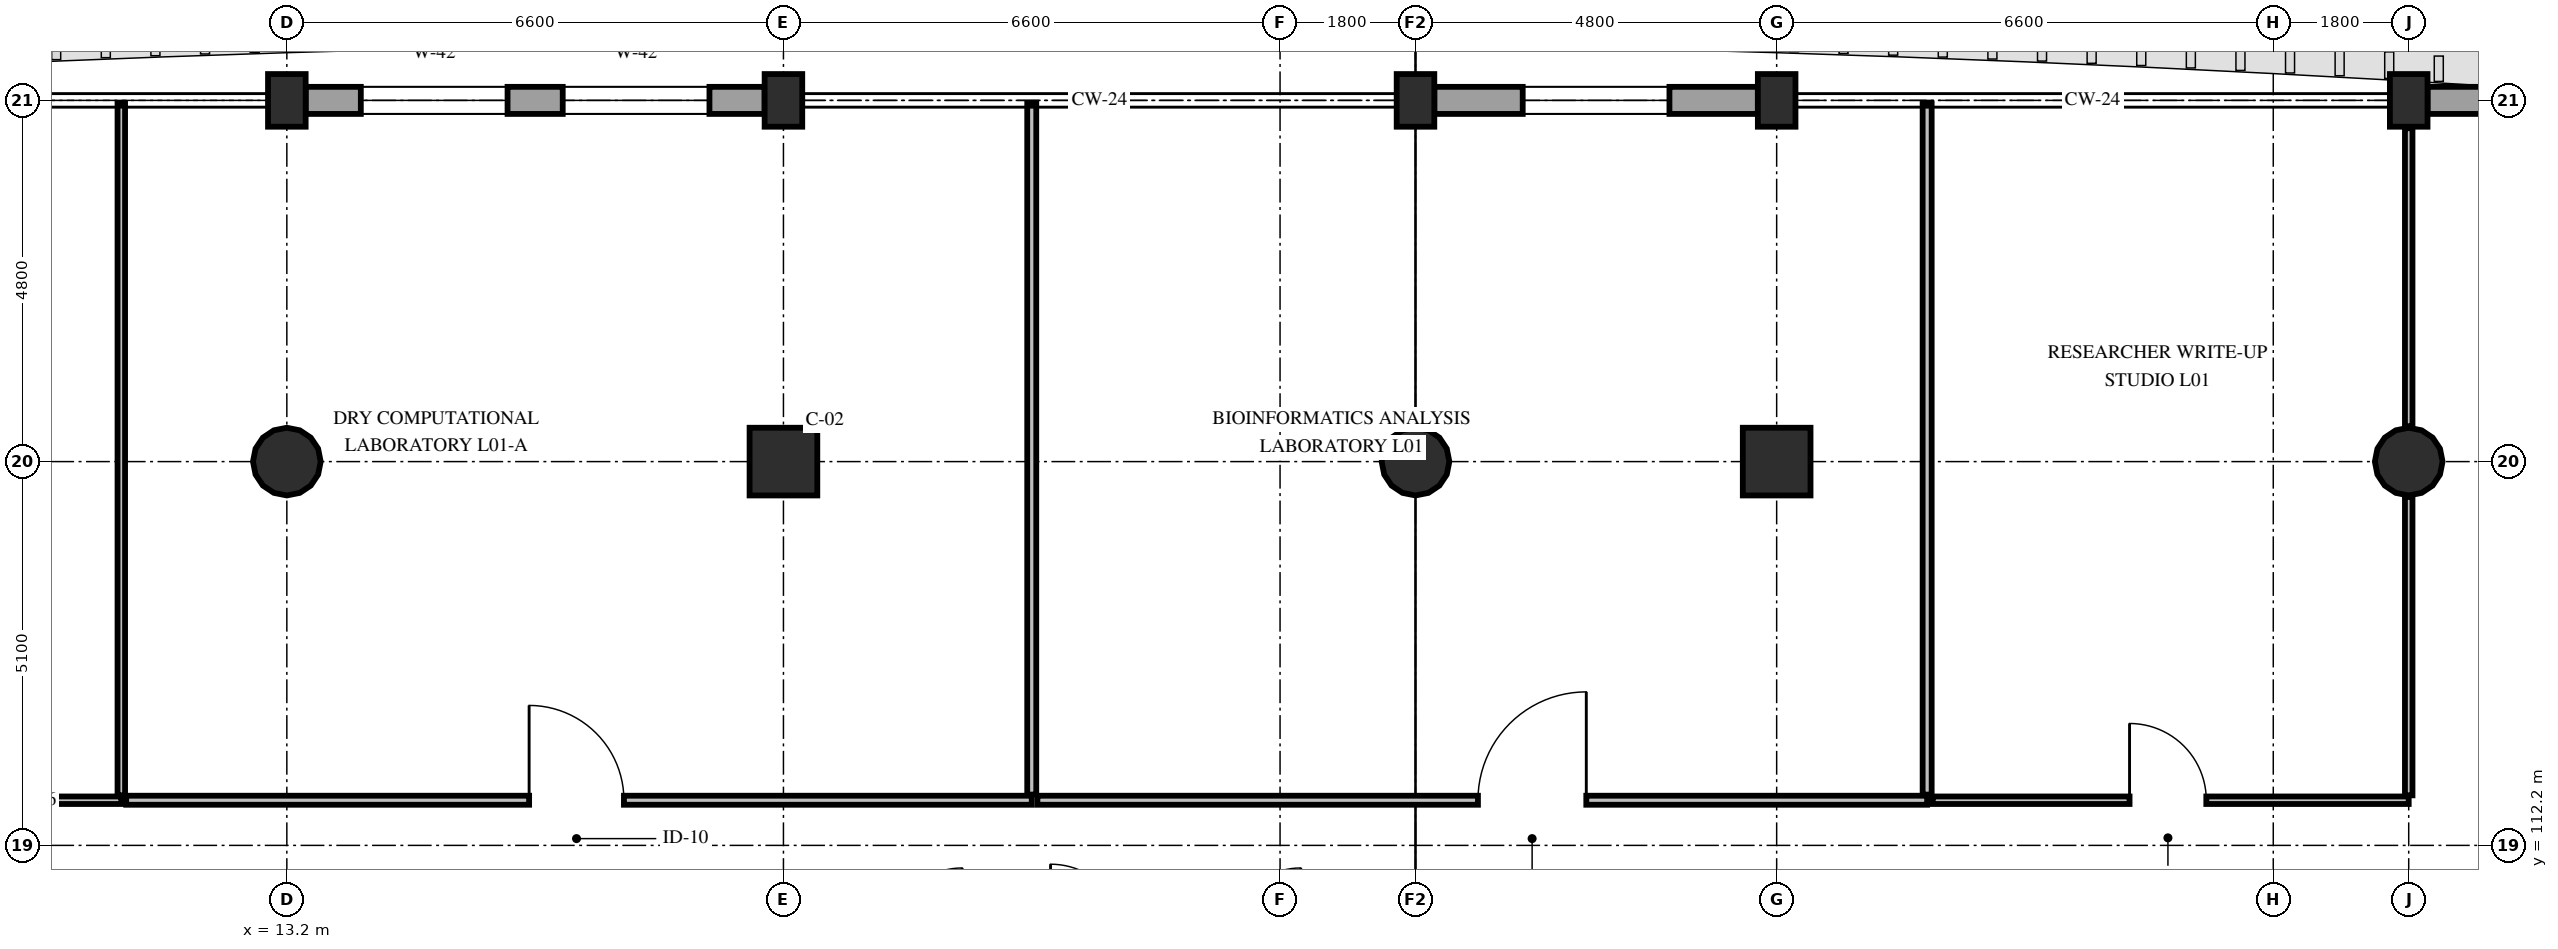
"""IFC4 building model, lengths in metres.
Left out: names, types, materials, properties, quantities, classifications, styles, units other than length and angle.
Written with IfcOpenShell. Run it as: python <this file> out.ifc"""

import sys

from ifc_helpers import new_model, si_unit, direction, frame, frame_2d, origin, origin_2d, place, context, subcontext, project, spatial, rectangle, circle, extrude, element, fill, save


model = new_model("IFC4")
c1 = context("Model", 3, precision=1e-05, world=origin(), true_north=direction((0.0, 1.0)))
c2 = subcontext(c1, "Body", "Model", "MODEL_VIEW")
j1 = project(units=[si_unit("LENGTHUNIT", "METRE"), si_unit("PLANEANGLEUNIT", "RADIAN")], contexts=[c1])
p1 = place(None, origin())
s1 = spatial("IfcSite", under=j1, at=p1, CompositionType="ELEMENT")
p2 = place(p1, origin())
s2 = spatial("IfcBuilding", under=s1, at=p2, CompositionType="ELEMENT")
p3 = place(p2, frame((0.0, 0.0, 5.4)))
s3 = spatial("IfcBuildingStorey", under=s2, at=p3, CompositionType="ELEMENT", Elevation=5.4)
p4 = place(p3, frame((13.2, 117.3, 0.0), z_axis=(0.0, 0.0, 1.0), x_axis=(1.0, 0.0, 0.0)))
e1 = element("IfcColumn", 1, at=p4, inside=s3, PredefinedType="COLUMN", context=c2, shape_type="SweptSolid", body=[
    extrude(circle(Radius=0.45, at=origin_2d()), origin(), (0.0, 0.0, 1.0), 4.8),
])
p5 = place(p3, frame((13.2, 122.1, 0.0), z_axis=(0.0, 0.0, 1.0), x_axis=(1.0, 0.0, 0.0)))
e2 = element("IfcColumn", 2, at=p5, inside=s3, PredefinedType="PILASTER", context=c2, shape_type="SweptSolid", body=[
    extrude(rectangle(XDim=0.5, YDim=0.7, at=origin_2d()), origin(), (0.0, 0.0, 1.0), 4.8),
])
p6 = place(p3, frame((19.8, 117.3, 0.0), z_axis=(0.0, 0.0, 1.0), x_axis=(1.0, 0.0, 0.0)))
e3 = element("IfcColumn", 3, at=p6, inside=s3, PredefinedType="COLUMN", context=c2, shape_type="SweptSolid", body=[
    extrude(rectangle(XDim=0.9, YDim=0.9, at=origin_2d()), origin(), (0.0, 0.0, 1.0), 4.8),
])
p7 = place(p3, frame((19.8, 122.1, 0.0), z_axis=(0.0, 0.0, 1.0), x_axis=(1.0, 0.0, 0.0)))
e4 = element("IfcColumn", 4, at=p7, inside=s3, PredefinedType="PILASTER", context=c2, shape_type="SweptSolid", body=[
    extrude(rectangle(XDim=0.5, YDim=0.7, at=origin_2d()), origin(), (0.0, 0.0, 1.0), 4.8),
])
p8 = place(p3, frame((28.2, 117.3, 0.0), z_axis=(0.0, 0.0, 1.0), x_axis=(1.0, 0.0, 0.0)))
e5 = element("IfcColumn", 5, at=p8, inside=s3, PredefinedType="COLUMN", context=c2, shape_type="SweptSolid", body=[
    extrude(circle(Radius=0.45, at=origin_2d()), origin(), (0.0, 0.0, 1.0), 4.8),
])
p9 = place(p3, frame((28.2, 122.1, 0.0), z_axis=(0.0, 0.0, 1.0), x_axis=(1.0, 0.0, 0.0)))
e6 = element("IfcColumn", 6, at=p9, inside=s3, PredefinedType="PILASTER", context=c2, shape_type="SweptSolid", body=[
    extrude(rectangle(XDim=0.5, YDim=0.7, at=origin_2d()), origin(), (0.0, 0.0, 1.0), 4.8),
])
p10 = place(p3, frame((33.0, 117.3, 0.0), z_axis=(0.0, 0.0, 1.0), x_axis=(1.0, 0.0, 0.0)))
e7 = element("IfcColumn", 7, at=p10, inside=s3, PredefinedType="COLUMN", context=c2, shape_type="SweptSolid", body=[
    extrude(rectangle(XDim=0.9, YDim=0.9, at=origin_2d()), origin(), (0.0, 0.0, 1.0), 4.8),
])
p11 = place(p3, frame((33.0, 122.1, 0.0), z_axis=(0.0, 0.0, 1.0), x_axis=(1.0, 0.0, 0.0)))
e8 = element("IfcColumn", 8, at=p11, inside=s3, PredefinedType="PILASTER", context=c2, shape_type="SweptSolid", body=[
    extrude(rectangle(XDim=0.5, YDim=0.7, at=origin_2d()), origin(), (0.0, 0.0, 1.0), 4.8),
])
p12 = place(p3, frame((41.4, 117.3, 0.0), z_axis=(0.0, 0.0, 1.0), x_axis=(1.0, 0.0, 0.0)))
e9 = element("IfcColumn", 9, at=p12, inside=s3, PredefinedType="COLUMN", context=c2, shape_type="SweptSolid", body=[
    extrude(circle(Radius=0.45, at=origin_2d()), origin(), (0.0, 0.0, 1.0), 4.8),
])
p13 = place(p3, frame((41.4, 122.1, 0.0), z_axis=(0.0, 0.0, 1.0), x_axis=(1.0, 0.0, 0.0)))
e10 = element("IfcColumn", 10, at=p13, inside=s3, PredefinedType="PILASTER", context=c2, shape_type="SweptSolid", body=[
    extrude(rectangle(XDim=0.5, YDim=0.7, at=origin_2d()), origin(), (0.0, 0.0, 1.0), 4.8),
])
p14 = place(p3, frame((13.45, 122.1, 0.0), z_axis=(0.0, 0.0, 1.0), x_axis=(1.0, 0.0, 0.0)))
e11 = element("IfcWall", 11, at=p14, inside=s3, PredefinedType="STANDARD", context=c2, shape_type="SweptSolid", body=[
    extrude(rectangle(XDim=6.1, YDim=0.36, at=frame_2d((3.05, 0.0))), origin(), (0.0, 0.0, 1.0), 3.93),
])
p15 = place(p14, frame((0.733, 0.0, 0.85)))
e12 = element("IfcOpeningElement", 12, at=p15, cuts=e11, PredefinedType="OPENING", context=c2, shape_type="SweptSolid", body=[
    extrude(rectangle(XDim=1.95, YDim=2.24, at=frame_2d((0.975, 1.12))), frame((0.0, 0.195, 0.0), z_axis=(0.0, -1.0, 0.0), x_axis=(1.0, 0.0, 0.0)), (0.0, 0.0, 1.0), 0.39),
])
p16 = place(p14, frame((3.417, 0.0, 0.85)))
e13 = element("IfcOpeningElement", 13, at=p16, cuts=e11, PredefinedType="OPENING", context=c2, shape_type="SweptSolid", body=[
    extrude(rectangle(XDim=1.95, YDim=2.24, at=frame_2d((0.975, 1.12))), frame((0.0, 0.195, 0.0), z_axis=(0.0, -1.0, 0.0), x_axis=(1.0, 0.0, 0.0)), (0.0, 0.0, 1.0), 0.39),
])
p17 = place(p3, frame((28.45, 122.1, 0.0), z_axis=(0.0, 0.0, 1.0), x_axis=(1.0, 0.0, 0.0)))
e14 = element("IfcWall", 14, at=p17, inside=s3, PredefinedType="STANDARD", context=c2, shape_type="SweptSolid", body=[
    extrude(rectangle(XDim=4.3, YDim=0.36, at=frame_2d((2.15, 0.0))), origin(), (0.0, 0.0, 1.0), 3.95),
])
p18 = place(p17, frame((1.175, 0.0, 0.85)))
e15 = element("IfcOpeningElement", 15, at=p18, cuts=e14, PredefinedType="OPENING", context=c2, shape_type="SweptSolid", body=[
    extrude(rectangle(XDim=1.95, YDim=2.24, at=frame_2d((0.975, 1.12))), frame((0.0, 0.195, 0.0), z_axis=(0.0, -1.0, 0.0), x_axis=(1.0, 0.0, 0.0)), (0.0, 0.0, 1.0), 0.39),
])
p19 = place(p3, frame((41.65, 122.1, 0.0), z_axis=(0.0, 0.0, 1.0), x_axis=(1.0, 0.0, 0.0)))
e16 = element("IfcWall", 16, at=p19, inside=s3, PredefinedType="STANDARD", context=c2, shape_type="SweptSolid", body=[
    extrude(rectangle(XDim=4.2, YDim=0.36, at=frame_2d((2.1, 0.0))), origin(), (0.0, 0.0, 1.0), 3.95),
])
p20 = place(p19, frame((1.125, 0.0, 0.85)))
e17 = element("IfcOpeningElement", 17, at=p20, cuts=e16, PredefinedType="OPENING", context=c2, shape_type="SweptSolid", body=[
    extrude(rectangle(XDim=1.95, YDim=2.24, at=frame_2d((0.975, 1.12))), frame((0.0, 0.195, 0.0), z_axis=(0.0, -1.0, 0.0), x_axis=(1.0, 0.0, 0.0)), (0.0, 0.0, 1.0), 0.39),
])
p21 = place(p3, frame((4.865, 112.8, 0.0), z_axis=(0.0, 0.0, 1.0), x_axis=(1.0, 0.0, 0.0)))
e18 = element("IfcWall", 18, at=p21, inside=s3, PredefinedType="PARTITIONING", context=c2, shape_type="SweptSolid", body=[
    extrude(rectangle(XDim=6.135, YDim=0.1, at=frame_2d((3.067, 0.0))), origin(), (0.0, 0.0, 1.0), 4.13),
])
p22 = place(p21, frame((2.545, 0.0, 0.0)))
e19 = element("IfcOpeningElement", 19, at=p22, cuts=e18, PredefinedType="OPENING", context=c2, shape_type="SweptSolid", body=[
    extrude(rectangle(XDim=0.98, YDim=2.2, at=frame_2d((0.49, 1.1))), frame((0.0, 0.065, 0.0), z_axis=(0.0, -1.0, 0.0), x_axis=(1.0, 0.0, 0.0)), (0.0, 0.0, 1.0), 0.13),
])
p23 = place(p3, frame((11.0, 112.865, 0.0), z_axis=(0.0, 0.0, 1.0), x_axis=(0.0, 1.0, 0.0)))
e20 = element("IfcWall", 20, at=p23, inside=s3, PredefinedType="PARTITIONING", context=c2, shape_type="SweptSolid", body=[
    extrude(rectangle(XDim=9.195, YDim=0.1, at=frame_2d((4.598, 0.0))), origin(), (0.0, 0.0, 1.0), 3.83),
])
p24 = place(p3, frame((11.065, 112.8, 0.0), z_axis=(0.0, 0.0, 1.0), x_axis=(1.0, 0.0, 0.0)))
e21 = element("IfcWall", 21, at=p24, inside=s3, PredefinedType="PARTITIONING", context=c2, shape_type="SweptSolid", body=[
    extrude(rectangle(XDim=12.035, YDim=0.12, at=frame_2d((6.018, 0.0))), origin(), (0.0, 0.0, 1.0), 4.13),
])
p25 = place(p24, frame((5.355, 0.0, 0.0)))
e22 = element("IfcOpeningElement", 22, at=p25, cuts=e21, PredefinedType="OPENING", context=c2, shape_type="SweptSolid", body=[
    extrude(rectangle(XDim=1.26, YDim=2.2, at=frame_2d((0.63, 1.1))), frame((0.0, 0.075, 0.0), z_axis=(0.0, -1.0, 0.0), x_axis=(1.0, 0.0, 0.0)), (0.0, 0.0, 1.0), 0.15),
])
p26 = place(p3, frame((23.1, 112.875, 0.0), z_axis=(0.0, 0.0, 1.0), x_axis=(0.0, 1.0, 0.0)))
e23 = element("IfcWall", 23, at=p26, inside=s3, PredefinedType="PARTITIONING", context=c2, shape_type="SweptSolid", body=[
    extrude(rectangle(XDim=9.185, YDim=0.12, at=frame_2d((4.593, 0.0))), origin(), (0.0, 0.0, 1.0), 3.83),
])
p27 = place(p3, frame((23.175, 112.8, 0.0), z_axis=(0.0, 0.0, 1.0), x_axis=(1.0, 0.0, 0.0)))
e24 = element("IfcWall", 24, at=p27, inside=s3, PredefinedType="PARTITIONING", context=c2, shape_type="SweptSolid", body=[
    extrude(rectangle(XDim=11.825, YDim=0.12, at=frame_2d((5.913, 0.0))), origin(), (0.0, 0.0, 1.0), 4.13),
])
p28 = place(p27, frame((5.855, 0.0, 0.0)))
e25 = element("IfcOpeningElement", 25, at=p28, cuts=e24, PredefinedType="OPENING", context=c2, shape_type="SweptSolid", body=[
    extrude(rectangle(XDim=1.44, YDim=2.25, at=frame_2d((0.72, 1.125))), frame((0.0, 0.075, 0.0), z_axis=(0.0, -1.0, 0.0), x_axis=(1.0, 0.0, 0.0)), (0.0, 0.0, 1.0), 0.15),
])
p29 = place(p3, frame((35.0, 112.875, 0.0), z_axis=(0.0, 0.0, 1.0), x_axis=(0.0, 1.0, 0.0)))
e26 = element("IfcWall", 26, at=p29, inside=s3, PredefinedType="PARTITIONING", context=c2, shape_type="SweptSolid", body=[
    extrude(rectangle(XDim=9.185, YDim=0.12, at=frame_2d((4.593, 0.0))), origin(), (0.0, 0.0, 1.0), 3.83),
])
p30 = place(p3, frame((35.075, 112.8, 0.0), z_axis=(0.0, 0.0, 1.0), x_axis=(1.0, 0.0, 0.0)))
e27 = element("IfcWall", 27, at=p30, inside=s3, PredefinedType="PARTITIONING", context=c2, shape_type="SweptSolid", body=[
    extrude(rectangle(XDim=6.325, YDim=0.1, at=frame_2d((3.163, 0.0))), origin(), (0.0, 0.0, 1.0), 4.13),
])
p31 = place(p30, frame((2.615, 0.0, 0.0)))
e28 = element("IfcOpeningElement", 28, at=p31, cuts=e27, PredefinedType="OPENING", context=c2, shape_type="SweptSolid", body=[
    extrude(rectangle(XDim=1.02, YDim=2.2, at=frame_2d((0.51, 1.1))), frame((0.0, 0.065, 0.0), z_axis=(0.0, -1.0, 0.0), x_axis=(1.0, 0.0, 0.0)), (0.0, 0.0, 1.0), 0.13),
])
p32 = place(p3, frame((41.4, 112.865, 0.0), z_axis=(0.0, 0.0, 1.0), x_axis=(0.0, 1.0, 0.0)))
e29 = element("IfcWall", 29, at=p32, inside=s3, PredefinedType="PARTITIONING", context=c2, shape_type="SweptSolid", body=[
    extrude(rectangle(XDim=3.965, YDim=0.1, at=frame_2d((1.982, 0.0))), origin(), (0.0, 0.0, 1.0), 4.13),
])
p33 = place(p3, frame((41.4, 117.77, 0.0), z_axis=(0.0, 0.0, 1.0), x_axis=(0.0, 1.0, 0.0)))
e30 = element("IfcWall", 30, at=p33, inside=s3, PredefinedType="PARTITIONING", context=c2, shape_type="SweptSolid", body=[
    extrude(rectangle(XDim=3.96, YDim=0.1, at=frame_2d((1.98, 0.0))), origin(), (0.0, 0.0, 1.0), 4.13),
])
p34 = place(p15, origin())
e31 = element("IfcWindow", 31, at=p34, inside=s3, PartitioningType="DOUBLE_PANEL_VERTICAL", PredefinedType="WINDOW", context=c2, shape_type="SweptSolid", body=[
    extrude(rectangle(XDim=1.95, YDim=2.24, at=frame_2d((0.975, 1.12))), frame((0.0, 0.03, 0.0), z_axis=(0.0, -1.0, 0.0), x_axis=(1.0, 0.0, 0.0)), (0.0, 0.0, 1.0), 0.06),
])
fill(e12, e31)
p35 = place(p16, origin())
e32 = element("IfcWindow", 32, at=p35, inside=s3, PartitioningType="DOUBLE_PANEL_VERTICAL", PredefinedType="WINDOW", context=c2, shape_type="SweptSolid", body=[
    extrude(rectangle(XDim=1.95, YDim=2.24, at=frame_2d((0.975, 1.12))), frame((0.0, 0.03, 0.0), z_axis=(0.0, -1.0, 0.0), x_axis=(1.0, 0.0, 0.0)), (0.0, 0.0, 1.0), 0.06),
])
fill(e13, e32)
p36 = place(p18, origin())
e33 = element("IfcWindow", 33, at=p36, inside=s3, PartitioningType="DOUBLE_PANEL_VERTICAL", PredefinedType="WINDOW", context=c2, shape_type="SweptSolid", body=[
    extrude(rectangle(XDim=1.95, YDim=2.24, at=frame_2d((0.975, 1.12))), frame((0.0, 0.03, 0.0), z_axis=(0.0, -1.0, 0.0), x_axis=(1.0, 0.0, 0.0)), (0.0, 0.0, 1.0), 0.06),
])
fill(e15, e33)
p37 = place(p25, origin())
e34 = element("IfcDoor", 34, at=p37, inside=s3, OperationType="SINGLE_SWING_LEFT", PredefinedType="DOOR", context=c2, shape_type="SweptSolid", body=[
    extrude(rectangle(XDim=1.26, YDim=2.2, at=frame_2d((0.63, 1.1))), frame((0.0, 0.025, 0.0), z_axis=(0.0, -1.0, 0.0), x_axis=(1.0, 0.0, 0.0)), (0.0, 0.0, 1.0), 0.05),
])
fill(e22, e34)
p38 = place(p28, origin())
e35 = element("IfcDoor", 35, at=p38, inside=s3, OperationType="SINGLE_SWING_RIGHT", PredefinedType="DOOR", context=c2, shape_type="SweptSolid", body=[
    extrude(rectangle(XDim=1.44, YDim=2.25, at=frame_2d((0.72, 1.125))), frame((0.0, 0.025, 0.0), z_axis=(0.0, -1.0, 0.0), x_axis=(1.0, 0.0, 0.0)), (0.0, 0.0, 1.0), 0.05),
])
fill(e25, e35)
p39 = place(p31, origin())
e36 = element("IfcDoor", 36, at=p39, inside=s3, OperationType="SINGLE_SWING_LEFT", PredefinedType="DOOR", context=c2, shape_type="SweptSolid", body=[
    extrude(rectangle(XDim=1.02, YDim=2.2, at=frame_2d((0.51, 1.1))), frame((0.0, 0.025, 0.0), z_axis=(0.0, -1.0, 0.0), x_axis=(1.0, 0.0, 0.0)), (0.0, 0.0, 1.0), 0.05),
])
fill(e28, e36)
save(model, sys.argv[1])
